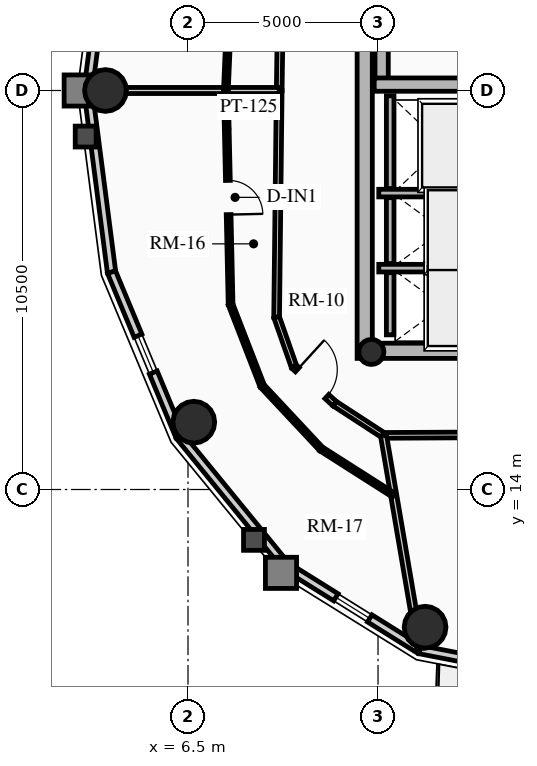
"""IFC4 building model, lengths in metres.
Left out: names, types, materials, properties, quantities, classifications, styles, units other than length and angle.
Written with IfcOpenShell. Run it as: python <this file> out.ifc"""

import sys

from ifc_helpers import new_model, si_unit, direction, frame, frame_2d, origin, origin_2d, place, context, subcontext, project, spatial, rectangle, circle, hollow_circle, extrude, source, transform, mapped, element, fill, save


model = new_model("IFC4")
c1 = context("Model", 3, precision=1e-05, world=origin(), true_north=direction((0.0, 1.0)))
c2 = subcontext(c1, "Body", "Model", "MODEL_VIEW")
j1 = project(units=[si_unit("LENGTHUNIT", "METRE"), si_unit("PLANEANGLEUNIT", "RADIAN")], contexts=[c1])
p1 = place(None, origin())
s1 = spatial("IfcSite", under=j1, at=p1, CompositionType="ELEMENT")
p2 = place(p1, origin())
s2 = spatial("IfcBuilding", under=s1, at=p2, CompositionType="ELEMENT")
p3 = place(p2, frame((0.0, 0.0, 226.05)))
s3 = spatial("IfcBuildingStorey", under=s2, at=p3, CompositionType="ELEMENT", Elevation=226.05)
p4 = place(p3, frame((11.15, 17.45, 0.0), z_axis=(0.0, 0.0, 1.0), x_axis=(0.0, 1.0, 0.0)))
e1 = element("IfcWall", 1, at=p4, inside=s3, PredefinedType="SHEAR", context=c2, shape_type="SweptSolid", body=[
    extrude(rectangle(XDim=14.1, YDim=0.4, at=frame_2d((7.05, 0.0))), origin(), (0.0, 0.0, 1.0), 3.2),
])
p5 = place(p3, frame((11.15, 17.65, 0.0), z_axis=(0.0, 0.0, 1.0), x_axis=(1.0, 0.0, 0.0)))
e2 = element("IfcWall", 2, at=p5, inside=s3, PredefinedType="SHEAR", context=c2, shape_type="SweptSolid", body=[
    extrude(rectangle(XDim=10.7, YDim=0.4, at=frame_2d((5.35, 0.0))), origin(), (0.0, 0.0, 1.0), 3.2),
])
m1 = source(origin(), c2, "Body", "SweptSolid", [
    extrude(rectangle(XDim=1.5, YDim=2.02, at=frame_2d((0.75, 1.01))), frame((0.0, 0.21, 0.0), z_axis=(0.0, -1.0, 0.0), x_axis=(1.0, 0.0, 0.0)), (0.0, 0.0, 1.0), 0.42),
])
p6 = place(p5, frame((5.45, 0.0, 0.0)))
e3 = element("IfcOpeningElement", 3, at=p6, cuts=e2, PredefinedType="OPENING", context=c2, shape_type="MappedRepresentation", body=[
    mapped(m1, transform((0.0, 0.0, 0.0), x_axis=(1.0, 0.0, 0.0), y_axis=(0.0, 1.0, 0.0), z_axis=(0.0, 0.0, 1.0), scale=1.0)),
])
p7 = place(p3, frame((11.595, 24.655, 0.0), z_axis=(0.0, 0.0, 1.0), x_axis=(0.0, 1.0, 0.0)))
e4 = element("IfcWall", 4, at=p7, inside=s3, PredefinedType="SHEAR", context=c2, shape_type="SweptSolid", body=[
    extrude(rectangle(XDim=6.695, YDim=0.35, at=frame_2d((3.348, 0.0))), origin(), (0.0, 0.0, 1.0), 3.2),
])
p8 = place(p3, frame((11.4, 24.655, 0.0), z_axis=(0.0, 0.0, 1.0), x_axis=(1.0, 0.0, 0.0)))
e5 = element("IfcWall", 5, at=p8, inside=s3, PredefinedType="SHEAR", context=c2, shape_type="SweptSolid", body=[
    extrude(rectangle(XDim=3.285, YDim=0.35, at=frame_2d((1.643, 0.0))), origin(), (0.0, 0.0, 1.0), 3.2),
])
p9 = place(p3, frame((11.325, 17.62, 0.0), z_axis=(0.0, 0.0, 1.0), x_axis=(1.0, 0.0, 0.0)))
e6 = element("IfcColumn", 6, at=p9, inside=s3, PredefinedType="COLUMN", context=c2, shape_type="SweptSolid", body=[
    extrude(hollow_circle(Radius=0.33, WallThickness=0.025, at=origin_2d()), origin(), (0.0, 0.0, 1.0), 3.2),
])
for number, where, z_axis, x_axis in (
    (7, (4.328, 24.5, 0.0), (0.0, 0.0, 1.0), (1.0, 0.0, 0.0)),
    (8, (6.653, 15.771, 0.0), (0.0, 0.0, 1.0), (1.0, 0.0, 0.0)),
    (9, (12.739, 10.377, 0.0), (0.0, 0.0, 1.0), (1.0, 0.0, 0.0)),
):
    element("IfcColumn", number, at=place(p3, frame(where, z_axis=z_axis, x_axis=x_axis)), inside=s3, PredefinedType="USERDEFINED", context=c2, shape_type="SweptSolid", body=[
        extrude(circle(Radius=0.55, at=origin_2d()), origin(), (0.0, 0.0, 1.0), 3.2),
    ])
p10 = place(p3, frame((3.87, 24.5, 0.0), z_axis=(0.0, 0.0, 1.0), x_axis=(0.128241318541, 0.991742993027, 0.0)))
e10 = element("IfcWall", 10, at=p10, inside=s3, PredefinedType="SOLIDWALL", context=c2, shape_type="SweptSolid", body=[
    extrude(rectangle(XDim=4.82, YDim=0.22, at=frame_2d((2.41, 0.0))), origin(), (0.0, 0.0, 1.0), 2.612),
])
m2 = source(origin(), c2, "Body", "SweptSolid", [
    extrude(rectangle(XDim=1.05, YDim=1.3, at=frame_2d((0.525, 0.65))), frame((0.0, 0.12, 0.0), z_axis=(0.0, -1.0, 0.0), x_axis=(1.0, 0.0, 0.0)), (0.0, 0.0, 1.0), 0.24),
])
p11 = place(p10, frame((1.885, 0.0, 0.65)))
e11 = element("IfcOpeningElement", 11, at=p11, cuts=e10, PredefinedType="OPENING", context=c2, shape_type="MappedRepresentation", body=[
    mapped(m2, transform((0.0, 0.0, 0.0), x_axis=(1.0, 0.0, 0.0), y_axis=(0.0, 1.0, 0.0), z_axis=(0.0, 0.0, 1.0), scale=1.0)),
])
p12 = place(p3, frame((4.488, 19.719, 0.0), z_axis=(0.0, 0.0, 1.0), x_axis=(-0.128241318541, 0.991742993027, 0.0)))
e12 = element("IfcWall", 12, at=p12, inside=s3, PredefinedType="SOLIDWALL", context=c2, shape_type="SweptSolid", body=[
    extrude(rectangle(XDim=4.82, YDim=0.22, at=frame_2d((2.41, 0.0))), origin(), (0.0, 0.0, 1.0), 2.612),
])
p13 = place(p3, frame((6.282, 15.407, 0.0), z_axis=(0.0, 0.0, 1.0), x_axis=(-0.384036305194, 0.923317993052, 0.0)))
e13 = element("IfcWall", 13, at=p13, inside=s3, PredefinedType="SOLIDWALL", context=c2, shape_type="SweptSolid", body=[
    extrude(rectangle(XDim=4.671, YDim=0.22, at=frame_2d((2.335, 0.0))), origin(), (0.0, 0.0, 1.0), 2.612),
])
p14 = place(p13, frame((1.81, 0.0, 0.65)))
e14 = element("IfcOpeningElement", 14, at=p14, cuts=e13, PredefinedType="OPENING", context=c2, shape_type="MappedRepresentation", body=[
    mapped(m2, transform((0.0, 0.0, 0.0), x_axis=(1.0, 0.0, 0.0), y_axis=(0.0, 1.0, 0.0), z_axis=(0.0, 0.0, 1.0), scale=1.0)),
])
p15 = place(p3, frame((9.076, 11.985, 0.0), z_axis=(0.0, 0.0, 1.0), x_axis=(-0.632467166636, 0.774587169483, 0.0)))
e15 = element("IfcWall", 15, at=p15, inside=s3, PredefinedType="SOLIDWALL", context=c2, shape_type="SweptSolid", body=[
    extrude(rectangle(XDim=4.418, YDim=0.22, at=frame_2d((2.209, 0.0))), origin(), (0.0, 0.0, 1.0), 2.612),
])
p16 = place(p3, frame((12.597, 9.787, 0.0), z_axis=(0.0, 0.0, 1.0), x_axis=(-0.848318713376, 0.529485939886, 0.0)))
e16 = element("IfcWall", 16, at=p16, inside=s3, PredefinedType="SOLIDWALL", context=c2, shape_type="SweptSolid", body=[
    extrude(rectangle(XDim=4.15, YDim=0.22, at=frame_2d((2.075, 0.0))), origin(), (0.0, 0.0, 1.0), 2.612),
])
p17 = place(p16, frame((1.55, 0.0, 0.65)))
e17 = element("IfcOpeningElement", 17, at=p17, cuts=e16, PredefinedType="OPENING", context=c2, shape_type="MappedRepresentation", body=[
    mapped(m2, transform((0.0, 0.0, 0.0), x_axis=(1.0, 0.0, 0.0), y_axis=(0.0, 1.0, 0.0), z_axis=(0.0, 0.0, 1.0), scale=1.0)),
])
p18 = place(p3, frame((16.5, 9.03, 0.0), z_axis=(0.0, 0.0, 1.0), x_axis=(-0.981700307484, 0.190432419211, 0.0)))
e18 = element("IfcWall", 18, at=p18, inside=s3, PredefinedType="SOLIDWALL", context=c2, shape_type="SweptSolid", body=[
    extrude(rectangle(XDim=3.976, YDim=0.22, at=frame_2d((1.988, 0.0))), origin(), (0.0, 0.0, 1.0), 2.612),
])
m3 = source(origin(), c2, "Body", "SweptSolid", [
    extrude(rectangle(XDim=1.15, YDim=2.005, at=frame_2d((0.575, 1.002))), frame((0.0, 0.12, 0.0), z_axis=(0.0, -1.0, 0.0), x_axis=(1.0, 0.0, 0.0)), (0.0, 0.0, 1.0), 0.24),
])
p19 = place(p18, frame((1.413, 0.0, 0.0)))
e19 = element("IfcOpeningElement", 19, at=p19, cuts=e18, PredefinedType="OPENING", context=c2, shape_type="MappedRepresentation", body=[
    mapped(m3, transform((0.0, 0.0, 0.0), x_axis=(1.0, 0.0, 0.0), y_axis=(0.0, 1.0, 0.0), z_axis=(0.0, 0.0, 1.0), scale=1.0)),
])
p20 = place(p3, frame((11.52, 21.8, 0.0), z_axis=(0.0, 0.0, 1.0), x_axis=(1.0, 0.0, 0.0)))
e20 = element("IfcWall", 20, at=p20, inside=s3, PredefinedType="SHEAR", context=c2, shape_type="SweptSolid", body=[
    extrude(rectangle(XDim=2.97, YDim=0.2, at=frame_2d((1.485, 0.0))), origin(), (0.0, 0.0, 1.0), 3.2),
])
p21 = place(p3, frame((11.82, 21.92, 0.0), z_axis=(0.0, 0.0, 1.0), x_axis=(0.0, 1.0, 0.0)))
e21 = element("IfcWall", 21, at=p21, inside=s3, PredefinedType="SHEAR", context=c2, shape_type="SweptSolid", body=[
    extrude(rectangle(XDim=2.44, YDim=0.2, at=frame_2d((1.22, 0.0))), origin(), (0.0, 0.0, 1.0), 3.2),
])
p22 = place(p3, frame((11.52, 19.825, 0.0), z_axis=(0.0, 0.0, 1.0), x_axis=(1.0, 0.0, 0.0)))
e22 = element("IfcWall", 22, at=p22, inside=s3, PredefinedType="SHEAR", context=c2, shape_type="SweptSolid", body=[
    extrude(rectangle(XDim=2.97, YDim=0.2, at=frame_2d((1.485, 0.0))), origin(), (0.0, 0.0, 1.0), 3.2),
])
p23 = place(p3, frame((11.82, 19.945, 0.0), z_axis=(0.0, 0.0, 1.0), x_axis=(0.0, 1.0, 0.0)))
e23 = element("IfcWall", 23, at=p23, inside=s3, PredefinedType="SHEAR", context=c2, shape_type="SweptSolid", body=[
    extrude(rectangle(XDim=1.735, YDim=0.2, at=frame_2d((0.867, 0.0))), origin(), (0.0, 0.0, 1.0), 3.2),
])
p24 = place(p3, frame((11.82, 18.07, 0.0), z_axis=(0.0, 0.0, 1.0), x_axis=(0.0, 1.0, 0.0)))
e24 = element("IfcWall", 24, at=p24, inside=s3, PredefinedType="SHEAR", context=c2, shape_type="SweptSolid", body=[
    extrude(rectangle(XDim=1.635, YDim=0.2, at=frame_2d((0.817, 0.0))), origin(), (0.0, 0.0, 1.0), 3.2),
])
p25 = place(p3, frame((8.986, 30.349, 0.0), z_axis=(0.0, 0.0, 1.0), x_axis=(-0.014775478218, -0.999890836663, 0.0)))
e25 = element("IfcWall", 25, at=p25, inside=s3, PredefinedType="PARTITIONING", context=c2, shape_type="SweptSolid", body=[
    extrude(rectangle(XDim=5.849, YDim=0.15, at=frame_2d((2.925, 0.0))), origin(), (0.0, 0.0, 1.0), 2.975),
])
p26 = place(p3, frame((8.9, 24.5, 0.0), z_axis=(0.0, 0.0, 1.0), x_axis=(-0.011416369353, -0.999934831132, 0.0)))
e26 = element("IfcWall", 26, at=p26, inside=s3, PredefinedType="PARTITIONING", context=c2, shape_type="SweptSolid", body=[
    extrude(rectangle(XDim=5.967, YDim=0.15, at=frame_2d((2.983, 0.0))), origin(), (0.0, 0.0, 1.0), 2.612),
])
p27 = place(p3, frame((8.832, 18.534, 0.0), z_axis=(0.0, 0.0, 1.0), x_axis=(0.332031819657, -0.943268186008, 0.0)))
e27 = element("IfcWall", 27, at=p27, inside=s3, PredefinedType="PARTITIONING", context=c2, shape_type="SweptSolid", body=[
    extrude(rectangle(XDim=1.377, YDim=0.15, at=frame_2d((0.688, 0.0))), origin(), (0.0, 0.0, 1.0), 2.545),
])
p28 = place(p3, frame((9.289, 17.235, 0.0), z_axis=(0.0, 0.0, 1.0), x_axis=(0.739015164946, -0.673688790155, 0.0)))
e28 = element("IfcWall", 28, at=p28, inside=s3, PredefinedType="PARTITIONING", context=c2, shape_type="SweptSolid", body=[
    extrude(rectangle(XDim=1.446, YDim=0.15, at=frame_2d((0.723, 0.0))), origin(), (0.0, 0.0, 1.0), 2.612),
])
m4 = source(origin(), c2, "Body", "SweptSolid", [
    extrude(rectangle(XDim=1.05, YDim=2.015, at=frame_2d((0.525, 1.007))), frame((0.0, 0.085, 0.0), z_axis=(0.0, -1.0, 0.0), x_axis=(1.0, 0.0, 0.0)), (0.0, 0.0, 1.0), 0.17),
])
p29 = place(p28, frame((0.12, 0.0, 0.0)))
e29 = element("IfcOpeningElement", 29, at=p29, cuts=e28, PredefinedType="OPENING", context=c2, shape_type="MappedRepresentation", body=[
    mapped(m4, transform((0.0, 0.0, 0.0), x_axis=(1.0, 0.0, 0.0), y_axis=(0.0, 1.0, 0.0), z_axis=(0.0, 0.0, 1.0), scale=1.0)),
])
p30 = place(p3, frame((10.358, 16.26, 0.0), z_axis=(0.0, 0.0, 1.0), x_axis=(0.838265397059, -0.545262435983, 0.0)))
e30 = element("IfcWall", 30, at=p30, inside=s3, PredefinedType="PARTITIONING", context=c2, shape_type="SweptSolid", body=[
    extrude(rectangle(XDim=1.534, YDim=0.15, at=frame_2d((0.767, 0.0))), origin(), (0.0, 0.0, 1.0), 2.545),
])
p31 = place(p3, frame((11.644, 15.424, 0.0), z_axis=(0.0, 0.0, 1.0), x_axis=(0.999986552511, 0.005186019339, 0.0)))
e31 = element("IfcWall", 31, at=p31, inside=s3, PredefinedType="PARTITIONING", context=c2, shape_type="SweptSolid", body=[
    extrude(rectangle(XDim=3.201, YDim=0.15, at=frame_2d((1.601, 0.0))), origin(), (0.0, 0.0, 1.0), 2.612),
])
p32 = place(p3, frame((8.9, 24.5, 0.0), z_axis=(0.0, 0.0, 1.0), x_axis=(-1.0, 0.0, 0.0)))
e32 = element("IfcWall", 32, at=p32, inside=s3, PredefinedType="PARTITIONING", context=c2, shape_type="SweptSolid", body=[
    extrude(rectangle(XDim=5.01, YDim=0.16, at=frame_2d((2.505, 0.0))), origin(), (0.0, 0.0, 1.0), 2.612),
])
p33 = place(p3, frame((11.644, 15.424, 0.0), z_axis=(0.0, 0.0, 1.0), x_axis=(0.168350269159, -0.985727237563, 0.0)))
e33 = element("IfcWall", 33, at=p33, inside=s3, PredefinedType="PARTITIONING", context=c2, shape_type="SweptSolid", body=[
    extrude(rectangle(XDim=5.699, YDim=0.16, at=frame_2d((2.85, 0.0))), origin(), (0.0, 0.0, 1.0), 2.612),
])
p34 = place(p3, frame((7.732, 30.048, 0.0), z_axis=(0.0, 0.0, 1.0), x_axis=(-0.042296211955, -0.999105114817, 0.0)))
e34 = element("IfcWall", 34, at=p34, inside=s3, PredefinedType="PARTITIONING", context=c2, shape_type="SweptSolid", body=[
    extrude(rectangle(XDim=5.553, YDim=0.125, at=frame_2d((2.776, 0.0))), origin(), (0.0, 0.0, 1.0), 2.975),
])
m5 = source(origin(), c2, "Body", "SweptSolid", [
    extrude(rectangle(XDim=0.9, YDim=2.005, at=frame_2d((0.45, 1.002))), frame((0.0, 0.073, 0.0), z_axis=(0.0, -1.0, 0.0), x_axis=(1.0, 0.0, 0.0)), (0.0, 0.0, 1.0), 0.145),
])
p35 = place(p34, frame((2.326, 0.0, 0.0)))
e35 = element("IfcOpeningElement", 35, at=p35, cuts=e34, PredefinedType="OPENING", context=c2, shape_type="MappedRepresentation", body=[
    mapped(m5, transform((0.0, 0.0, 0.0), x_axis=(1.0, 0.0, 0.0), y_axis=(0.0, 1.0, 0.0), z_axis=(0.0, 0.0, 1.0), scale=1.0)),
])
p36 = place(p3, frame((7.497, 24.5, 0.0), z_axis=(0.0, 0.0, 1.0), x_axis=(0.021927972859, -0.999759553096, 0.0)))
e36 = element("IfcWall", 36, at=p36, inside=s3, PredefinedType="PARTITIONING", context=c2, shape_type="SweptSolid", body=[
    extrude(rectangle(XDim=5.634, YDim=0.125, at=frame_2d((2.817, 0.0))), origin(), (0.0, 0.0, 1.0), 2.612),
])
p37 = place(p36, frame((2.367, 0.0, 0.0)))
e37 = element("IfcOpeningElement", 37, at=p37, cuts=e36, PredefinedType="OPENING", context=c2, shape_type="MappedRepresentation", body=[
    mapped(m5, transform((0.0, 0.0, 0.0), x_axis=(1.0, 0.0, 0.0), y_axis=(0.0, 1.0, 0.0), z_axis=(0.0, 0.0, 1.0), scale=1.0)),
])
p38 = place(p3, frame((7.621, 18.868, 0.0), z_axis=(0.0, 0.0, 1.0), x_axis=(0.361712646649, -0.93228963378, 0.0)))
e38 = element("IfcWall", 38, at=p38, inside=s3, PredefinedType="PARTITIONING", context=c2, shape_type="SweptSolid", body=[
    extrude(rectangle(XDim=2.297, YDim=0.125, at=frame_2d((1.148, 0.0))), origin(), (0.0, 0.0, 1.0), 2.545),
])
p39 = place(p3, frame((8.452, 16.726, 0.0), z_axis=(0.0, 0.0, 1.0), x_axis=(0.68299988274, -0.730418482911, 0.0)))
e39 = element("IfcWall", 39, at=p39, inside=s3, PredefinedType="PARTITIONING", context=c2, shape_type="SweptSolid", body=[
    extrude(rectangle(XDim=2.271, YDim=0.125, at=frame_2d((1.135, 0.0))), origin(), (0.0, 0.0, 1.0), 2.612),
])
p40 = place(p3, frame((10.002, 15.068, 0.0), z_axis=(0.0, 0.0, 1.0), x_axis=(0.843381706724, -0.537314895349, 0.0)))
e40 = element("IfcWall", 40, at=p40, inside=s3, PredefinedType="PARTITIONING", context=c2, shape_type="SweptSolid", body=[
    extrude(rectangle(XDim=2.265, YDim=0.125, at=frame_2d((1.132, 0.0))), origin(), (0.0, 0.0, 1.0), 2.545),
])
m6 = source(origin(), c2, "Body", "SweptSolid", [
    extrude(rectangle(XDim=1.05, YDim=1.3, at=frame_2d((0.525, 0.65))), frame((0.0, 0.03, 0.0), z_axis=(0.0, -1.0, 0.0), x_axis=(1.0, 0.0, 0.0)), (0.0, 0.0, 1.0), 0.06),
])
p41 = place(p14, origin())
e41 = element("IfcWindow", 41, at=p41, inside=s3, PartitioningType="SINGLE_PANEL", PredefinedType="WINDOW", context=c2, shape_type="MappedRepresentation", body=[
    mapped(m6, transform((0.0, 0.0, 0.0), x_axis=(1.0, 0.0, 0.0), y_axis=(0.0, 1.0, 0.0), z_axis=(0.0, 0.0, 1.0), scale=1.0)),
])
fill(e14, e41)
p42 = place(p17, origin())
e42 = element("IfcWindow", 42, at=p42, inside=s3, PartitioningType="SINGLE_PANEL", PredefinedType="WINDOW", context=c2, shape_type="MappedRepresentation", body=[
    mapped(m6, transform((0.0, 0.0, 0.0), x_axis=(1.0, 0.0, 0.0), y_axis=(0.0, 1.0, 0.0), z_axis=(0.0, 0.0, 1.0), scale=1.0)),
])
fill(e17, e42)
m7 = source(origin(), c2, "Body", "SweptSolid", [
    extrude(rectangle(XDim=1.05, YDim=2.015, at=frame_2d((0.525, 1.007))), frame((0.0, 0.025, 0.0), z_axis=(0.0, -1.0, 0.0), x_axis=(1.0, 0.0, 0.0)), (0.0, 0.0, 1.0), 0.05),
])
p43 = place(p29, origin())
e43 = element("IfcDoor", 43, at=p43, inside=s3, OperationType="SINGLE_SWING_LEFT", PredefinedType="DOOR", context=c2, shape_type="MappedRepresentation", body=[
    mapped(m7, transform((0.0, 0.0, 0.0), x_axis=(1.0, 0.0, 0.0), y_axis=(0.0, 1.0, 0.0), z_axis=(0.0, 0.0, 1.0), scale=1.0)),
])
fill(e29, e43)
m8 = source(origin(), c2, "Body", "SweptSolid", [
    extrude(rectangle(XDim=0.9, YDim=2.005, at=frame_2d((0.45, 1.002))), frame((0.0, 0.025, 0.0), z_axis=(0.0, -1.0, 0.0), x_axis=(1.0, 0.0, 0.0)), (0.0, 0.0, 1.0), 0.05),
])
p44 = place(p37, origin())
e44 = element("IfcDoor", 44, at=p44, inside=s3, OperationType="SINGLE_SWING_RIGHT", PredefinedType="DOOR", context=c2, shape_type="MappedRepresentation", body=[
    mapped(m8, transform((0.0, 0.0, 0.0), x_axis=(1.0, 0.0, 0.0), y_axis=(0.0, 1.0, 0.0), z_axis=(0.0, 0.0, 1.0), scale=1.0)),
])
fill(e37, e44)
save(model, sys.argv[1])
